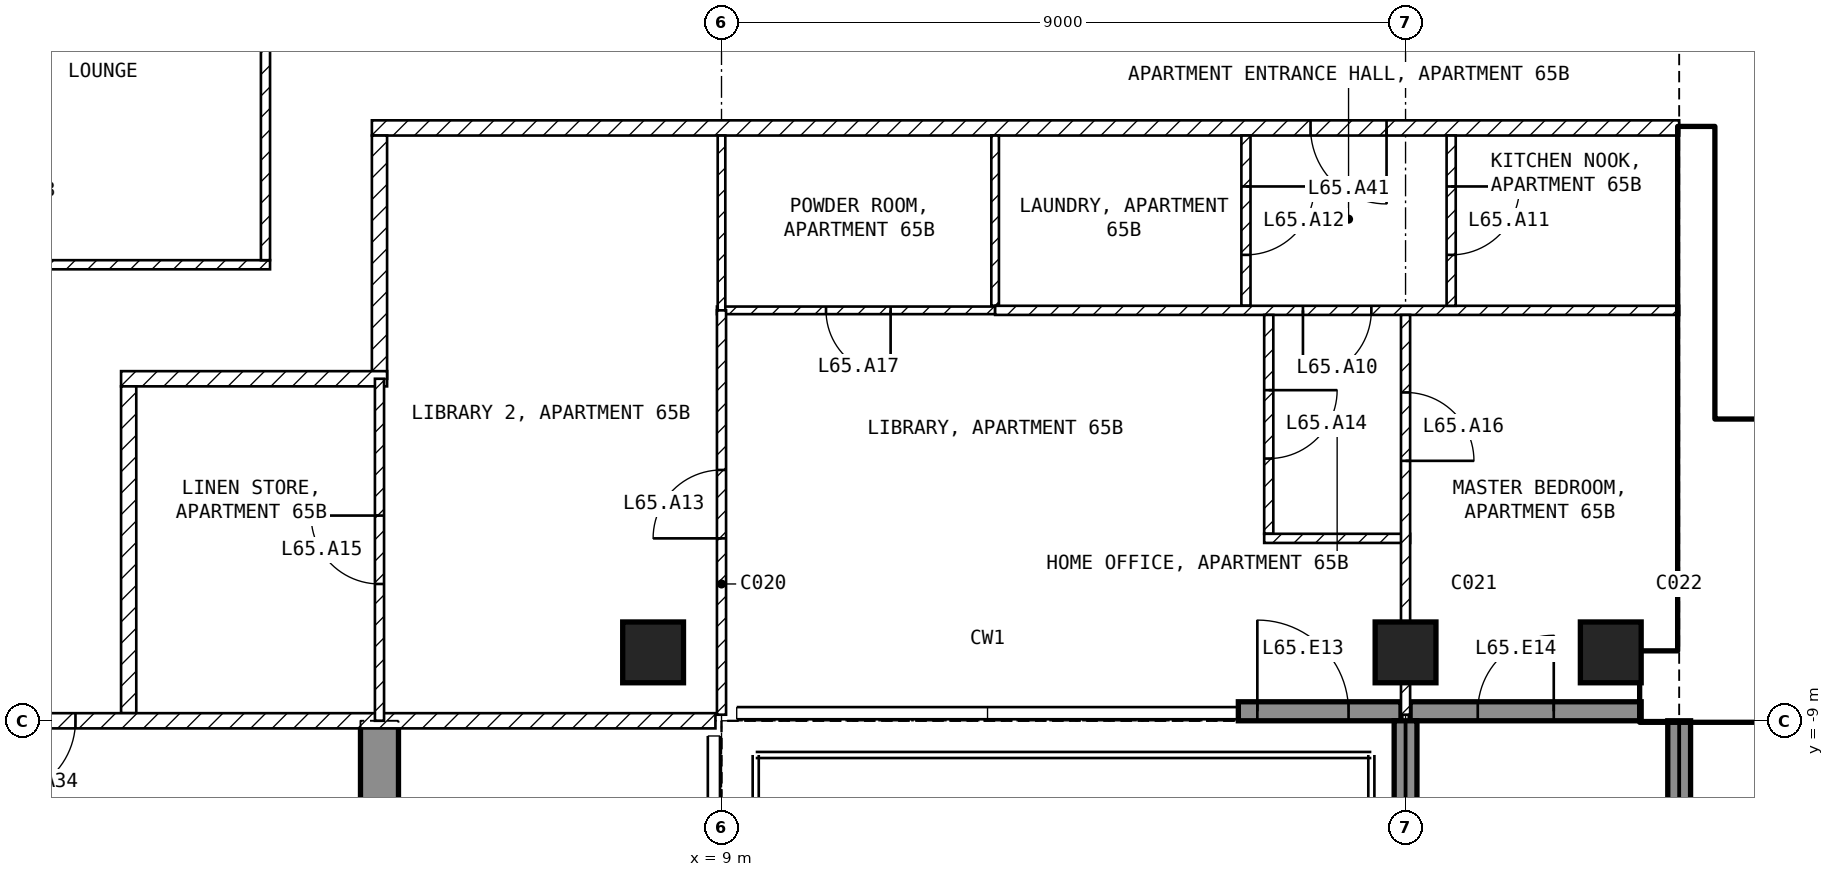
"""IFC4 building model, lengths in metres.
Left out: names, types, materials, properties, quantities, classifications, styles, units other than length and angle.
Written with IfcOpenShell. Run it as: python <this file> out.ifc"""

import sys

from ifc_helpers import new_model, si_unit, direction, frame, frame_2d, origin, origin_2d, place, context, subcontext, project, spatial, polyline, rectangle, outline, extrude, element, fill, save


model = new_model("IFC4")
c1 = context("Model", 3, precision=1e-05, world=origin(), true_north=direction((0.0, 1.0)))
c2 = subcontext(c1, "Body", "Model", "MODEL_VIEW")
j1 = project(units=[si_unit("LENGTHUNIT", "METRE"), si_unit("PLANEANGLEUNIT", "RADIAN")], contexts=[c1])
p1 = place(None, origin())
s1 = spatial("IfcSite", under=j1, at=p1, CompositionType="ELEMENT")
p2 = place(p1, origin())
s2 = spatial("IfcBuilding", under=s1, at=p2, CompositionType="ELEMENT")
p3 = place(p2, frame((0.0, 0.0, 257.0)))
s3 = spatial("IfcBuildingStorey", under=s2, at=p3, CompositionType="ELEMENT", Elevation=257.0)
for number, where, z_axis, x_axis in (
    (1, (8.1, -8.1, -0.25), (0.0, 0.0, 1.0), (1.0, 0.0, 0.0)),
    (2, (18.0, -8.1, -0.25), (0.0, 0.0, 1.0), (1.0, 0.0, 0.0)),
    (3, (20.7, -8.1, -0.25), (0.0, 0.0, 1.0), (1.0, 0.0, 0.0)),
):
    element("IfcColumn", number, at=place(p3, frame(where, z_axis=z_axis, x_axis=x_axis)), inside=s3, PredefinedType="COLUMN", context=c2, shape_type="SweptSolid", body=[
        extrude(rectangle(XDim=0.8, YDim=0.8, at=origin_2d()), origin(), (0.0, 0.0, 1.0), 3.5),
    ])
p4 = place(p3, frame((4.25, -16.7, -0.25), z_axis=(1.0, 0.0, 0.0), x_axis=(0.0, 1.0, 0.0)))
e4 = element("IfcWall", 4, at=p4, inside=s3, PredefinedType="SHEAR", context=c2, shape_type="SweptSolid", body=[
    extrude(outline(polyline([(0.0, 0.0), (3.2, 0.0), (3.2, 2.65), (5.6, 2.65), (5.6, 0.0), (7.7, 0.0), (7.7, 3.5), (0.0, 3.5), (0.0, 0.0)])), origin(), (0.0, 0.0, 1.0), 0.5),
])
p5 = place(p3, frame((15.8, -8.875, 0.0), z_axis=(0.0, 0.0, 1.0), x_axis=(1.0, 0.0, 0.0)))
e5 = element("IfcWall", 5, at=p5, inside=s3, PredefinedType="SOLIDWALL", context=c2, shape_type="SweptSolid", body=[
    extrude(rectangle(XDim=2.14, YDim=0.25, at=frame_2d((1.07, 0.0))), origin(), (0.0, 0.0, 1.0), 3.25),
])
p6 = place(p5, frame((0.25, 0.0, 0.0)))
e6 = element("IfcOpeningElement", 6, at=p6, cuts=e5, PredefinedType="OPENING", context=c2, shape_type="SweptSolid", body=[
    extrude(rectangle(XDim=1.2, YDim=2.4, at=frame_2d((0.6, 1.2))), frame((0.0, 0.135, 0.0), z_axis=(0.0, -1.0, 0.0), x_axis=(1.0, 0.0, 0.0)), (0.0, 0.0, 1.0), 0.27),
])
p7 = place(p3, frame((18.06, -8.875, 0.0), z_axis=(0.0, 0.0, 1.0), x_axis=(1.0, 0.0, 0.0)))
e7 = element("IfcWall", 7, at=p7, inside=s3, PredefinedType="SOLIDWALL", context=c2, shape_type="SweptSolid", body=[
    extrude(rectangle(XDim=3.04, YDim=0.25, at=frame_2d((1.52, 0.0))), origin(), (0.0, 0.0, 1.0), 3.25),
])
p8 = place(p7, frame((0.89, 0.0, 0.0)))
e8 = element("IfcOpeningElement", 8, at=p8, cuts=e7, PredefinedType="OPENING", context=c2, shape_type="SweptSolid", body=[
    extrude(rectangle(XDim=1.0, YDim=2.4, at=frame_2d((0.5, 1.2))), frame((0.0, 0.135, 0.0), z_axis=(0.0, -1.0, 0.0), x_axis=(1.0, 0.0, 0.0)), (0.0, 0.0, 1.0), 0.27),
])
p9 = place(p3, frame((18.0, -9.0, 0.0), z_axis=(0.0, 0.0, 1.0), x_axis=(0.0, -1.0, 0.0)))
e9 = element("IfcWall", 9, at=p9, inside=s3, PredefinedType="SOLIDWALL", context=c2, shape_type="SweptSolid", body=[
    extrude(rectangle(XDim=2.74, YDim=0.3, at=frame_2d((1.37, 0.0))), origin(), (0.0, 0.0, 1.0), 3.25),
])
p10 = place(p3, frame((21.6, -9.0, 0.0), z_axis=(0.0, 0.0, 1.0), x_axis=(0.0, -1.0, 0.0)))
e10 = element("IfcWall", 10, at=p10, inside=s3, PredefinedType="SOLIDWALL", context=c2, shape_type="SweptSolid", body=[
    extrude(rectangle(XDim=2.7, YDim=0.3, at=frame_2d((1.35, 0.0))), origin(), (0.0, 0.0, 1.0), 3.25),
])
p11 = place(p3, frame((21.1, -8.55, 0.0), z_axis=(0.0, 0.0, 1.0), x_axis=(1.0, 0.0, 0.0)))
e11 = element("IfcWall", 11, at=p11, inside=s3, PredefinedType="SHEAR", context=c2, shape_type="SweptSolid", body=[
    extrude(rectangle(XDim=9.1, YDim=0.9, at=frame_2d((4.55, 0.0))), origin(), (0.0, 0.0, 1.0), 3.25),
])
p12 = place(p3, frame((21.825, -8.1, 0.0), z_axis=(0.0, 0.0, 1.0), x_axis=(0.0, 1.0, 0.0)))
e12 = element("IfcWall", 12, at=p12, inside=s3, PredefinedType="SHEAR", context=c2, shape_type="SweptSolid", body=[
    extrude(rectangle(XDim=6.9, YDim=0.45, at=frame_2d((3.45, 0.0))), origin(), (0.0, 0.0, 1.0), 3.25),
])
p13 = place(p3, frame((22.05, -5.15, 0.0), z_axis=(0.0, 0.0, 1.0), x_axis=(1.0, 0.0, 0.0)))
e13 = element("IfcWall", 13, at=p13, inside=s3, PredefinedType="SOLIDWALL", context=c2, shape_type="SweptSolid", body=[
    extrude(rectangle(XDim=6.3, YDim=0.2, at=frame_2d((3.15, 0.0))), origin(), (0.0, 0.0, 1.0), 3.25),
])
p14 = place(p13, frame((0.2, 0.0, 0.0)))
e14 = element("IfcOpeningElement", 14, at=p14, cuts=e13, PredefinedType="OPENING", context=c2, shape_type="SweptSolid", body=[
    extrude(rectangle(XDim=1.0, YDim=2.1, at=frame_2d((0.5, 1.05))), frame((0.0, 0.11, 0.0), z_axis=(0.0, -1.0, 0.0), x_axis=(1.0, 0.0, 0.0)), (0.0, 0.0, 1.0), 0.22),
])
p15 = place(p3, frame((-3.06, -3.0, 0.0), z_axis=(0.0, 0.0, 1.0), x_axis=(1.0, 0.0, 0.0)))
e15 = element("IfcWall", 15, at=p15, inside=s3, PredefinedType="PARTITIONING", context=c2, shape_type="SweptSolid", body=[
    extrude(rectangle(XDim=6.12, YDim=0.12, at=frame_2d((3.06, 0.0))), origin(), (0.0, 0.0, 1.0), 3.25),
])
p16 = place(p3, frame((3.0, -2.94, 0.0), z_axis=(0.0, 0.0, 1.0), x_axis=(0.0, 1.0, 0.0)))
e16 = element("IfcWall", 16, at=p16, inside=s3, PredefinedType="PARTITIONING", context=c2, shape_type="SweptSolid", body=[
    extrude(rectangle(XDim=5.88, YDim=0.12, at=frame_2d((2.94, 0.0))), origin(), (0.0, 0.0, 1.0), 3.25),
])
p17 = place(p3, frame((21.6, -1.2, 0.0), z_axis=(0.0, 0.0, 1.0), x_axis=(-1.0, 0.0, 0.0)))
e17 = element("IfcWall", 17, at=p17, inside=s3, PredefinedType="PARTITIONING", context=c2, shape_type="SweptSolid", body=[
    extrude(rectangle(XDim=17.2, YDim=0.2, at=frame_2d((8.6, 0.0))), origin(), (0.0, 0.0, 1.0), 3.25),
])
p18 = place(p17, frame((3.85, 0.0, 0.0)))
e18 = element("IfcOpeningElement", 18, at=p18, cuts=e17, PredefinedType="OPENING", context=c2, shape_type="SweptSolid", body=[
    extrude(rectangle(XDim=1.0, YDim=2.1, at=frame_2d((0.5, 1.05))), frame((0.0, 0.11, 0.0), z_axis=(0.0, -1.0, 0.0), x_axis=(1.0, 0.0, 0.0)), (0.0, 0.0, 1.0), 0.22),
])
p19 = place(p3, frame((4.5, -1.3, 0.0), z_axis=(0.0, 0.0, 1.0), x_axis=(0.0, -1.0, 0.0)))
e19 = element("IfcWall", 19, at=p19, inside=s3, PredefinedType="PARTITIONING", context=c2, shape_type="SweptSolid", body=[
    extrude(rectangle(XDim=3.2, YDim=0.2, at=frame_2d((1.6, 0.0))), origin(), (0.0, 0.0, 1.0), 3.25),
])
p20 = place(p3, frame((4.6, -4.5, 0.0), z_axis=(0.0, 0.0, 1.0), x_axis=(-1.0, 0.0, 0.0)))
e20 = element("IfcWall", 20, at=p20, inside=s3, PredefinedType="PARTITIONING", context=c2, shape_type="SweptSolid", body=[
    extrude(rectangle(XDim=3.5, YDim=0.2, at=frame_2d((1.75, 0.0))), origin(), (0.0, 0.0, 1.0), 3.25),
])
p21 = place(p3, frame((1.2, -4.6, 0.0), z_axis=(0.0, 0.0, 1.0), x_axis=(0.0, -1.0, 0.0)))
e21 = element("IfcWall", 21, at=p21, inside=s3, PredefinedType="PARTITIONING", context=c2, shape_type="SweptSolid", body=[
    extrude(rectangle(XDim=4.3, YDim=0.2, at=frame_2d((2.15, 0.0))), origin(), (0.0, 0.0, 1.0), 3.25),
])
p22 = place(p3, frame((8.92, -9.0, 0.0), z_axis=(0.0, 0.0, 1.0), x_axis=(-1.0, 0.0, 0.0)))
e22 = element("IfcWall", 22, at=p22, inside=s3, PredefinedType="PARTITIONING", context=c2, shape_type="SweptSolid", body=[
    extrude(rectangle(XDim=17.84, YDim=0.2, at=frame_2d((8.92, 0.0))), origin(), (0.0, 0.0, 1.0), 3.25),
])
p23 = place(p22, frame((8.42, 0.0, 0.0)))
e23 = element("IfcOpeningElement", 23, at=p23, cuts=e22, PredefinedType="OPENING", context=c2, shape_type="SweptSolid", body=[
    extrude(rectangle(XDim=1.0, YDim=2.1, at=frame_2d((0.5, 1.05))), frame((0.0, 0.11, 0.0), z_axis=(0.0, -1.0, 0.0), x_axis=(1.0, 0.0, 0.0)), (0.0, 0.0, 1.0), 0.22),
])
p24 = place(p3, frame((12.6, -1.3, 0.0), z_axis=(0.0, 0.0, 1.0), x_axis=(0.0, -1.0, 0.0)))
e24 = element("IfcWall", 24, at=p24, inside=s3, PredefinedType="PARTITIONING", context=c2, shape_type="SweptSolid", body=[
    extrude(rectangle(XDim=2.24, YDim=0.1, at=frame_2d((1.12, 0.0))), origin(), (0.0, 0.0, 1.0), 3.25),
])
p25 = place(p3, frame((12.6, -3.6, 0.0), z_axis=(0.0, 0.0, 1.0), x_axis=(-1.0, 0.0, 0.0)))
e25 = element("IfcWall", 25, at=p25, inside=s3, PredefinedType="PARTITIONING", context=c2, shape_type="SweptSolid", body=[
    extrude(rectangle(XDim=3.66, YDim=0.1, at=frame_2d((1.83, 0.0))), origin(), (0.0, 0.0, 1.0), 3.25),
])
p26 = place(p25, frame((1.375, 0.0, 0.0)))
e26 = element("IfcOpeningElement", 26, at=p26, cuts=e25, PredefinedType="OPENING", context=c2, shape_type="SweptSolid", body=[
    extrude(rectangle(XDim=0.85, YDim=2.1, at=frame_2d((0.425, 1.05))), frame((0.0, 0.06, 0.0), z_axis=(0.0, -1.0, 0.0), x_axis=(1.0, 0.0, 0.0)), (0.0, 0.0, 1.0), 0.12),
])
p27 = place(p3, frame((9.0, -3.6, 0.0), z_axis=(0.0, 0.0, 1.0), x_axis=(0.0, 1.0, 0.0)))
e27 = element("IfcWall", 27, at=p27, inside=s3, PredefinedType="PARTITIONING", context=c2, shape_type="SweptSolid", body=[
    extrude(rectangle(XDim=2.3, YDim=0.1, at=frame_2d((1.15, 0.0))), origin(), (0.0, 0.0, 1.0), 3.25),
])
p28 = place(p3, frame((15.9, -1.3, 0.0), z_axis=(0.0, 0.0, 1.0), x_axis=(0.0, -1.0, 0.0)))
e28 = element("IfcWall", 28, at=p28, inside=s3, PredefinedType="PARTITIONING", context=c2, shape_type="SweptSolid", body=[
    extrude(rectangle(XDim=2.24, YDim=0.12, at=frame_2d((1.12, 0.0))), origin(), (0.0, 0.0, 1.0), 3.25),
])
p29 = place(p28, frame((0.67, 0.0, 0.0)))
e29 = element("IfcOpeningElement", 29, at=p29, cuts=e28, PredefinedType="OPENING", context=c2, shape_type="SweptSolid", body=[
    extrude(rectangle(XDim=0.9, YDim=2.1, at=frame_2d((0.45, 1.05))), frame((0.0, 0.07, 0.0), z_axis=(0.0, -1.0, 0.0), x_axis=(1.0, 0.0, 0.0)), (0.0, 0.0, 1.0), 0.14),
])
p30 = place(p3, frame((21.6, -3.6, 0.0), z_axis=(0.0, 0.0, 1.0), x_axis=(-1.0, 0.0, 0.0)))
e30 = element("IfcWall", 30, at=p30, inside=s3, PredefinedType="PARTITIONING", context=c2, shape_type="SweptSolid", body=[
    extrude(rectangle(XDim=9.0, YDim=0.12, at=frame_2d((4.5, 0.0))), origin(), (0.0, 0.0, 1.0), 3.25),
])
p31 = place(p30, frame((4.05, 0.0, 0.0)))
e31 = element("IfcOpeningElement", 31, at=p31, cuts=e30, PredefinedType="OPENING", context=c2, shape_type="SweptSolid", body=[
    extrude(rectangle(XDim=0.9, YDim=2.1, at=frame_2d((0.45, 1.05))), frame((0.0, 0.07, 0.0), z_axis=(0.0, -1.0, 0.0), x_axis=(1.0, 0.0, 0.0)), (0.0, 0.0, 1.0), 0.14),
])
p32 = place(p3, frame((18.6, -1.3, 0.0), z_axis=(0.0, 0.0, 1.0), x_axis=(0.0, -1.0, 0.0)))
e32 = element("IfcWall", 32, at=p32, inside=s3, PredefinedType="PARTITIONING", context=c2, shape_type="SweptSolid", body=[
    extrude(rectangle(XDim=2.24, YDim=0.12, at=frame_2d((1.12, 0.0))), origin(), (0.0, 0.0, 1.0), 3.25),
])
p33 = place(p32, frame((0.67, 0.0, 0.0)))
e33 = element("IfcOpeningElement", 33, at=p33, cuts=e32, PredefinedType="OPENING", context=c2, shape_type="SweptSolid", body=[
    extrude(rectangle(XDim=0.9, YDim=2.1, at=frame_2d((0.45, 1.05))), frame((0.0, 0.07, 0.0), z_axis=(0.0, -1.0, 0.0), x_axis=(1.0, 0.0, 0.0)), (0.0, 0.0, 1.0), 0.14),
])
p34 = place(p3, frame((16.2, -3.66, 0.0), z_axis=(0.0, 0.0, 1.0), x_axis=(0.0, -1.0, 0.0)))
e34 = element("IfcWall", 34, at=p34, inside=s3, PredefinedType="PARTITIONING", context=c2, shape_type="SweptSolid", body=[
    extrude(rectangle(XDim=2.88, YDim=0.12, at=frame_2d((1.44, 0.0))), origin(), (0.0, 0.0, 1.0), 3.25),
])
p35 = place(p34, frame((0.99, 0.0, 0.0)))
e35 = element("IfcOpeningElement", 35, at=p35, cuts=e34, PredefinedType="OPENING", context=c2, shape_type="SweptSolid", body=[
    extrude(rectangle(XDim=0.9, YDim=2.1, at=frame_2d((0.45, 1.05))), frame((0.0, 0.07, 0.0), z_axis=(0.0, -1.0, 0.0), x_axis=(1.0, 0.0, 0.0)), (0.0, 0.0, 1.0), 0.14),
])
p36 = place(p3, frame((16.14, -6.6, 0.0), z_axis=(0.0, 0.0, 1.0), x_axis=(1.0, 0.0, 0.0)))
e36 = element("IfcWall", 36, at=p36, inside=s3, PredefinedType="PARTITIONING", context=c2, shape_type="SweptSolid", body=[
    extrude(rectangle(XDim=1.92, YDim=0.12, at=frame_2d((0.96, 0.0))), origin(), (0.0, 0.0, 1.0), 3.25),
])
p37 = place(p3, frame((18.0, -3.66, 0.0), z_axis=(0.0, 0.0, 1.0), x_axis=(0.0, -1.0, 0.0)))
e37 = element("IfcWall", 37, at=p37, inside=s3, PredefinedType="PARTITIONING", context=c2, shape_type="SweptSolid", body=[
    extrude(rectangle(XDim=5.26, YDim=0.12, at=frame_2d((2.63, 0.0))), origin(), (0.0, 0.0, 1.0), 2.496),
])
p38 = place(p37, frame((1.02, 0.0, 0.0)))
e38 = element("IfcOpeningElement", 38, at=p38, cuts=e37, PredefinedType="OPENING", context=c2, shape_type="SweptSolid", body=[
    extrude(rectangle(XDim=0.9, YDim=2.1, at=frame_2d((0.45, 1.05))), frame((0.0, 0.07, 0.0), z_axis=(0.0, -1.0, 0.0), x_axis=(1.0, 0.0, 0.0)), (0.0, 0.0, 1.0), 0.14),
])
p39 = place(p3, frame((9.0, -8.92, 0.0), z_axis=(0.0, 0.0, 1.0), x_axis=(0.0, 1.0, 0.0)))
e39 = element("IfcWall", 39, at=p39, inside=s3, PredefinedType="PARTITIONING", context=c2, shape_type="SweptSolid", body=[
    extrude(rectangle(XDim=5.32, YDim=0.12, at=frame_2d((2.66, 0.0))), origin(), (0.0, 0.0, 1.0), 3.25),
])
p40 = place(p39, frame((2.32, 0.0, 0.0)))
e40 = element("IfcOpeningElement", 40, at=p40, cuts=e39, PredefinedType="OPENING", context=c2, shape_type="SweptSolid", body=[
    extrude(rectangle(XDim=0.9, YDim=2.1, at=frame_2d((0.45, 1.05))), frame((0.0, 0.07, 0.0), z_axis=(0.0, -1.0, 0.0), x_axis=(1.0, 0.0, 0.0)), (0.0, 0.0, 1.0), 0.14),
])
p41 = place(p3, frame((4.5, -9.0, 0.0), z_axis=(0.0, 0.0, 1.0), x_axis=(0.0, 1.0, 0.0)))
e41 = element("IfcWall", 41, at=p41, inside=s3, PredefinedType="PARTITIONING", context=c2, shape_type="SweptSolid", body=[
    extrude(rectangle(XDim=4.5, YDim=0.12, at=frame_2d((2.25, 0.0))), origin(), (0.0, 0.0, 1.0), 3.25),
])
p42 = place(p41, frame((1.8, 0.0, 0.0)))
e42 = element("IfcOpeningElement", 42, at=p42, cuts=e41, PredefinedType="OPENING", context=c2, shape_type="SweptSolid", body=[
    extrude(rectangle(XDim=0.9, YDim=2.1, at=frame_2d((0.45, 1.05))), frame((0.0, 0.07, 0.0), z_axis=(0.0, -1.0, 0.0), x_axis=(1.0, 0.0, 0.0)), (0.0, 0.0, 1.0), 0.14),
])
p43 = place(p6, origin())
e43 = element("IfcDoor", 43, at=p43, inside=s3, OperationType="SINGLE_SWING_LEFT", PredefinedType="DOOR", context=c2, shape_type="SweptSolid", body=[
    extrude(rectangle(XDim=1.2, YDim=2.4, at=frame_2d((0.6, 1.2))), frame((0.0, 0.025, 0.0), z_axis=(0.0, -1.0, 0.0), x_axis=(1.0, 0.0, 0.0)), (0.0, 0.0, 1.0), 0.05),
])
fill(e6, e43)
p44 = place(p8, origin())
e44 = element("IfcDoor", 44, at=p44, inside=s3, OperationType="SINGLE_SWING_RIGHT", PredefinedType="DOOR", context=c2, shape_type="SweptSolid", body=[
    extrude(rectangle(XDim=1.0, YDim=2.4, at=frame_2d((0.5, 1.2))), frame((0.0, 0.025, 0.0), z_axis=(0.0, -1.0, 0.0), x_axis=(1.0, 0.0, 0.0)), (0.0, 0.0, 1.0), 0.05),
])
fill(e8, e44)
p45 = place(p14, origin())
e45 = element("IfcDoor", 45, at=p45, inside=s3, OperationType="SINGLE_SWING_LEFT", PredefinedType="DOOR", context=c2, shape_type="SweptSolid", body=[
    extrude(rectangle(XDim=1.0, YDim=2.1, at=frame_2d((0.5, 1.05))), frame((0.0, 0.025, 0.0), z_axis=(0.0, -1.0, 0.0), x_axis=(1.0, 0.0, 0.0)), (0.0, 0.0, 1.0), 0.05),
])
fill(e14, e45)
p46 = place(p31, origin())
e46 = element("IfcDoor", 46, at=p46, inside=s3, OperationType="SINGLE_SWING_RIGHT", PredefinedType="DOOR", context=c2, shape_type="SweptSolid", body=[
    extrude(rectangle(XDim=0.9, YDim=2.1, at=frame_2d((0.45, 1.05))), frame((0.0, 0.025, 0.0), z_axis=(0.0, -1.0, 0.0), x_axis=(1.0, 0.0, 0.0)), (0.0, 0.0, 1.0), 0.05),
])
fill(e31, e46)
p47 = place(p33, origin())
e47 = element("IfcDoor", 47, at=p47, inside=s3, OperationType="SINGLE_SWING_LEFT", PredefinedType="DOOR", context=c2, shape_type="SweptSolid", body=[
    extrude(rectangle(XDim=0.9, YDim=2.1, at=frame_2d((0.45, 1.05))), frame((0.0, 0.025, 0.0), z_axis=(0.0, -1.0, 0.0), x_axis=(1.0, 0.0, 0.0)), (0.0, 0.0, 1.0), 0.05),
])
fill(e33, e47)
p48 = place(p29, origin())
e48 = element("IfcDoor", 48, at=p48, inside=s3, OperationType="SINGLE_SWING_LEFT", PredefinedType="DOOR", context=c2, shape_type="SweptSolid", body=[
    extrude(rectangle(XDim=0.9, YDim=2.1, at=frame_2d((0.45, 1.05))), frame((0.0, 0.025, 0.0), z_axis=(0.0, -1.0, 0.0), x_axis=(1.0, 0.0, 0.0)), (0.0, 0.0, 1.0), 0.05),
])
fill(e29, e48)
p49 = place(p40, origin())
e49 = element("IfcDoor", 49, at=p49, inside=s3, OperationType="SINGLE_SWING_LEFT", PredefinedType="DOOR", context=c2, shape_type="SweptSolid", body=[
    extrude(rectangle(XDim=0.9, YDim=2.1, at=frame_2d((0.45, 1.05))), frame((0.0, 0.025, 0.0), z_axis=(0.0, -1.0, 0.0), x_axis=(1.0, 0.0, 0.0)), (0.0, 0.0, 1.0), 0.05),
])
fill(e40, e49)
p50 = place(p35, origin())
e50 = element("IfcDoor", 50, at=p50, inside=s3, OperationType="SINGLE_SWING_LEFT", PredefinedType="DOOR", context=c2, shape_type="SweptSolid", body=[
    extrude(rectangle(XDim=0.9, YDim=2.1, at=frame_2d((0.45, 1.05))), frame((0.0, 0.025, 0.0), z_axis=(0.0, -1.0, 0.0), x_axis=(1.0, 0.0, 0.0)), (0.0, 0.0, 1.0), 0.05),
])
fill(e35, e50)
p51 = place(p42, origin())
e51 = element("IfcDoor", 51, at=p51, inside=s3, OperationType="SINGLE_SWING_RIGHT", PredefinedType="DOOR", context=c2, shape_type="SweptSolid", body=[
    extrude(rectangle(XDim=0.9, YDim=2.1, at=frame_2d((0.45, 1.05))), frame((0.0, 0.025, 0.0), z_axis=(0.0, -1.0, 0.0), x_axis=(1.0, 0.0, 0.0)), (0.0, 0.0, 1.0), 0.05),
])
fill(e42, e51)
p52 = place(p38, origin())
e52 = element("IfcDoor", 52, at=p52, inside=s3, OperationType="SINGLE_SWING_RIGHT", PredefinedType="DOOR", context=c2, shape_type="SweptSolid", body=[
    extrude(rectangle(XDim=0.9, YDim=2.1, at=frame_2d((0.45, 1.05))), frame((0.0, 0.025, 0.0), z_axis=(0.0, -1.0, 0.0), x_axis=(1.0, 0.0, 0.0)), (0.0, 0.0, 1.0), 0.05),
])
fill(e38, e52)
p53 = place(p26, origin())
e53 = element("IfcDoor", 53, at=p53, inside=s3, OperationType="SINGLE_SWING_LEFT", PredefinedType="DOOR", context=c2, shape_type="SweptSolid", body=[
    extrude(rectangle(XDim=0.85, YDim=2.1, at=frame_2d((0.425, 1.05))), frame((0.0, 0.025, 0.0), z_axis=(0.0, -1.0, 0.0), x_axis=(1.0, 0.0, 0.0)), (0.0, 0.0, 1.0), 0.05),
])
fill(e26, e53)
p54 = place(p23, origin())
e54 = element("IfcDoor", 54, at=p54, inside=s3, OperationType="SINGLE_SWING_RIGHT", PredefinedType="DOOR", context=c2, shape_type="SweptSolid", body=[
    extrude(rectangle(XDim=1.0, YDim=2.1, at=frame_2d((0.5, 1.05))), frame((0.0, 0.025, 0.0), z_axis=(0.0, -1.0, 0.0), x_axis=(1.0, 0.0, 0.0)), (0.0, 0.0, 1.0), 0.05),
])
fill(e23, e54)
p55 = place(p18, origin())
e55 = element("IfcDoor", 55, at=p55, inside=s3, OperationType="SINGLE_SWING_LEFT", PredefinedType="DOOR", context=c2, shape_type="SweptSolid", body=[
    extrude(rectangle(XDim=1.0, YDim=2.1, at=frame_2d((0.5, 1.05))), frame((0.0, 0.025, 0.0), z_axis=(0.0, -1.0, 0.0), x_axis=(1.0, 0.0, 0.0)), (0.0, 0.0, 1.0), 0.05),
])
fill(e18, e55)
save(model, sys.argv[1])
